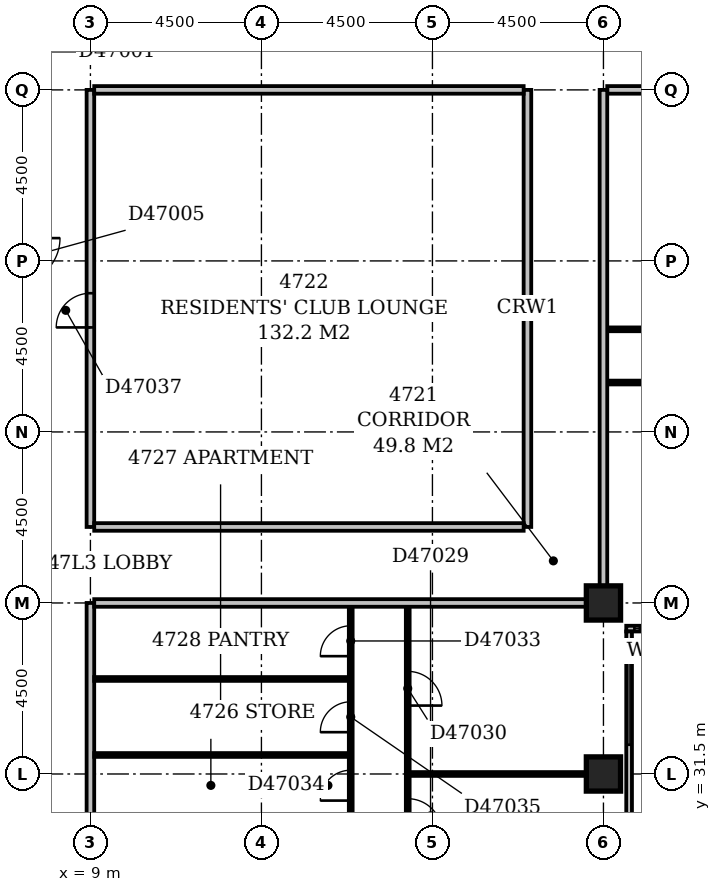
"""IFC4 building model, lengths in metres.
Left out: names, types, materials, properties, quantities, classifications, styles, units other than length and angle.
Written with IfcOpenShell. Run it as: python <this file> out.ifc"""

import sys

from ifc_helpers import new_model, si_unit, direction, frame, frame_2d, origin, origin_2d, place, context, subcontext, project, spatial, rectangle, extrude, element, fill, save


model = new_model("IFC4")
c1 = context("Model", 3, precision=1e-05, world=origin(), true_north=direction((0.0, 1.0)))
c2 = subcontext(c1, "Body", "Model", "MODEL_VIEW")
j1 = project(units=[si_unit("LENGTHUNIT", "METRE"), si_unit("PLANEANGLEUNIT", "RADIAN")], contexts=[c1])
p1 = place(None, origin())
s1 = spatial("IfcSite", under=j1, at=p1, CompositionType="ELEMENT")
p2 = place(p1, origin())
s2 = spatial("IfcBuilding", under=s1, at=p2, CompositionType="ELEMENT")
p3 = place(p2, frame((0.0, 0.0, 186.2)))
s3 = spatial("IfcBuildingStorey", under=s2, at=p3, CompositionType="ELEMENT", Elevation=186.2)
for number, where, z_axis, x_axis in (
    (1, (22.5, 31.5, -0.35), (0.0, 0.0, 1.0), (1.0, 0.0, 0.0)),
    (2, (22.5, 36.0, -0.35), (0.0, 0.0, 1.0), (1.0, 0.0, 0.0)),
):
    element("IfcColumn", number, at=place(p3, frame(where, z_axis=z_axis, x_axis=x_axis)), inside=s3, PredefinedType="COLUMN", context=c2, shape_type="SweptSolid", body=[
        extrude(rectangle(XDim=0.9, YDim=0.9, at=origin_2d()), origin(), (0.0, 0.0, 1.0), 3.65),
    ])
p4 = place(p3, frame((23.175, 17.4, 0.0), z_axis=(0.0, 0.0, 1.0), x_axis=(0.0, 1.0, 0.0)))
e3 = element("IfcWall", 3, at=p4, inside=s3, PredefinedType="STANDARD", context=c2, shape_type="SweptSolid", body=[
    extrude(rectangle(XDim=17.85, YDim=0.15, at=frame_2d((8.925, 0.0))), origin(), (0.0, 0.0, 1.0), 2.7),
])
p5 = place(p4, frame((2.937, 0.0, 0.6)))
e4 = element("IfcOpeningElement", 4, at=p5, cuts=e3, PredefinedType="OPENING", context=c2, shape_type="SweptSolid", body=[
    extrude(rectangle(XDim=1.5, YDim=1.8, at=frame_2d((0.75, 0.9))), frame((0.0, 0.087, 0.0), z_axis=(0.0, -1.0, 0.0), x_axis=(1.0, 0.0, 0.0)), (0.0, 0.0, 1.0), 0.174),
])
p6 = place(p4, frame((6.15, 0.0, 0.6)))
e5 = element("IfcOpeningElement", 5, at=p6, cuts=e3, PredefinedType="OPENING", context=c2, shape_type="SweptSolid", body=[
    extrude(rectangle(XDim=2.4, YDim=1.8, at=frame_2d((1.2, 0.9))), frame((0.0, 0.087, 0.0), z_axis=(0.0, -1.0, 0.0), x_axis=(1.0, 0.0, 0.0)), (0.0, 0.0, 1.0), 0.174),
])
p7 = place(p4, frame((10.65, 0.0, 0.6)))
e6 = element("IfcOpeningElement", 6, at=p7, cuts=e3, PredefinedType="OPENING", context=c2, shape_type="SweptSolid", body=[
    extrude(rectangle(XDim=2.4, YDim=1.8, at=frame_2d((1.2, 0.9))), frame((0.0, 0.087, 0.0), z_axis=(0.0, -1.0, 0.0), x_axis=(1.0, 0.0, 0.0)), (0.0, 0.0, 1.0), 0.174),
])
p8 = place(p4, frame((14.869, 0.0, 0.6)))
e7 = element("IfcOpeningElement", 7, at=p8, cuts=e3, PredefinedType="OPENING", context=c2, shape_type="SweptSolid", body=[
    extrude(rectangle(XDim=2.4, YDim=1.8, at=frame_2d((1.2, 0.9))), frame((0.0, 0.087, 0.0), z_axis=(0.0, -1.0, 0.0), x_axis=(1.0, 0.0, 0.0)), (0.0, 0.0, 1.0), 0.174),
])
p9 = place(p3, frame((23.1, 35.325, 0.0), z_axis=(0.0, 0.0, 1.0), x_axis=(1.0, 0.0, 0.0)))
e8 = element("IfcWall", 8, at=p9, inside=s3, PredefinedType="STANDARD", context=c2, shape_type="SweptSolid", body=[
    extrude(rectangle(XDim=27.15, YDim=0.15, at=frame_2d((13.575, 0.0))), origin(), (0.0, 0.0, 1.0), 2.7),
])
p10 = place(p9, frame((0.214, 0.0, 0.6)))
e9 = element("IfcOpeningElement", 9, at=p10, cuts=e8, PredefinedType="OPENING", context=c2, shape_type="SweptSolid", body=[
    extrude(rectangle(XDim=0.45, YDim=1.8, at=frame_2d((0.225, 0.9))), frame((0.0, 0.087, 0.0), z_axis=(0.0, -1.0, 0.0), x_axis=(1.0, 0.0, 0.0)), (0.0, 0.0, 1.0), 0.174),
])
p11 = place(p9, frame((2.239, 0.0, 0.6)))
e10 = element("IfcOpeningElement", 10, at=p11, cuts=e8, PredefinedType="OPENING", context=c2, shape_type="SweptSolid", body=[
    extrude(rectangle(XDim=0.9, YDim=1.8, at=frame_2d((0.45, 0.9))), frame((0.0, 0.087, 0.0), z_axis=(0.0, -1.0, 0.0), x_axis=(1.0, 0.0, 0.0)), (0.0, 0.0, 1.0), 0.174),
])
p12 = place(p9, frame((4.95, 0.0, 0.6)))
e11 = element("IfcOpeningElement", 11, at=p12, cuts=e8, PredefinedType="OPENING", context=c2, shape_type="SweptSolid", body=[
    extrude(rectangle(XDim=2.4, YDim=1.8, at=frame_2d((1.2, 0.9))), frame((0.0, 0.087, 0.0), z_axis=(0.0, -1.0, 0.0), x_axis=(1.0, 0.0, 0.0)), (0.0, 0.0, 1.0), 0.174),
])
p13 = place(p9, frame((9.45, 0.0, 0.6)))
e12 = element("IfcOpeningElement", 12, at=p13, cuts=e8, PredefinedType="OPENING", context=c2, shape_type="SweptSolid", body=[
    extrude(rectangle(XDim=2.4, YDim=1.8, at=frame_2d((1.2, 0.9))), frame((0.0, 0.087, 0.0), z_axis=(0.0, -1.0, 0.0), x_axis=(1.0, 0.0, 0.0)), (0.0, 0.0, 1.0), 0.174),
])
p14 = place(p9, frame((13.95, 0.0, 0.6)))
e13 = element("IfcOpeningElement", 13, at=p14, cuts=e8, PredefinedType="OPENING", context=c2, shape_type="SweptSolid", body=[
    extrude(rectangle(XDim=2.4, YDim=1.8, at=frame_2d((1.2, 0.9))), frame((0.0, 0.087, 0.0), z_axis=(0.0, -1.0, 0.0), x_axis=(1.0, 0.0, 0.0)), (0.0, 0.0, 1.0), 0.174),
])
p15 = place(p9, frame((18.45, 0.0, 0.6)))
e14 = element("IfcOpeningElement", 14, at=p15, cuts=e8, PredefinedType="OPENING", context=c2, shape_type="SweptSolid", body=[
    extrude(rectangle(XDim=2.4, YDim=1.8, at=frame_2d((1.2, 0.9))), frame((0.0, 0.087, 0.0), z_axis=(0.0, -1.0, 0.0), x_axis=(1.0, 0.0, 0.0)), (0.0, 0.0, 1.0), 0.174),
])
p16 = place(p9, frame((22.631, 0.0, 0.6)))
e15 = element("IfcOpeningElement", 15, at=p16, cuts=e8, PredefinedType="OPENING", context=c2, shape_type="SweptSolid", body=[
    extrude(rectangle(XDim=1.8, YDim=1.8, at=frame_2d((0.9, 0.9))), frame((0.0, 0.087, 0.0), z_axis=(0.0, -1.0, 0.0), x_axis=(1.0, 0.0, 0.0)), (0.0, 0.0, 1.0), 0.174),
])
p17 = place(p3, frame((9.0, 5.0, 0.0), z_axis=(0.0, 0.0, 1.0), x_axis=(0.0, 1.0, 0.0)))
e16 = element("IfcWall", 16, at=p17, inside=s3, PredefinedType="PARTITIONING", context=c2, shape_type="SweptSolid", body=[
    extrude(rectangle(XDim=31.0, YDim=0.2, at=frame_2d((15.5, 0.0))), origin(), (0.0, 0.0, 1.0), 3.3),
])
p18 = place(p17, frame((17.8, 0.0, 0.0)))
e17 = element("IfcOpeningElement", 17, at=p18, cuts=e16, PredefinedType="OPENING", context=c2, shape_type="SweptSolid", body=[
    extrude(rectangle(XDim=1.0, YDim=2.1, at=frame_2d((0.5, 1.05))), frame((0.0, 0.112, 0.0), z_axis=(0.0, -1.0, 0.0), x_axis=(1.0, 0.0, 0.0)), (0.0, 0.0, 1.0), 0.224),
])
p19 = place(p17, frame((14.95, 0.0, 0.0)))
e18 = element("IfcOpeningElement", 18, at=p19, cuts=e16, PredefinedType="OPENING", context=c2, shape_type="SweptSolid", body=[
    extrude(rectangle(XDim=1.0, YDim=2.1, at=frame_2d((0.5, 1.05))), frame((0.0, 0.112, 0.0), z_axis=(0.0, -1.0, 0.0), x_axis=(1.0, 0.0, 0.0)), (0.0, 0.0, 1.0), 0.224),
])
p20 = place(p17, frame((9.3, 0.0, 0.0)))
e19 = element("IfcOpeningElement", 19, at=p20, cuts=e16, PredefinedType="OPENING", context=c2, shape_type="SweptSolid", body=[
    extrude(rectangle(XDim=1.0, YDim=2.1, at=frame_2d((0.5, 1.05))), frame((0.0, 0.112, 0.0), z_axis=(0.0, -1.0, 0.0), x_axis=(1.0, 0.0, 0.0)), (0.0, 0.0, 1.0), 0.224),
])
p21 = place(p17, frame((1.5, 0.0, 0.0)))
e20 = element("IfcOpeningElement", 20, at=p21, cuts=e16, PredefinedType="OPENING", context=c2, shape_type="SweptSolid", body=[
    extrude(rectangle(XDim=0.9, YDim=2.1, at=frame_2d((0.45, 1.05))), frame((0.0, 0.112, 0.0), z_axis=(0.0, -1.0, 0.0), x_axis=(1.0, 0.0, 0.0)), (0.0, 0.0, 1.0), 0.224),
])
p22 = place(p3, frame((17.35, 22.6, 0.0), z_axis=(0.0, 0.0, 1.0), x_axis=(0.0, 1.0, 0.0)))
e21 = element("IfcWall", 21, at=p22, inside=s3, PredefinedType="PARTITIONING", context=c2, shape_type="SweptSolid", body=[
    extrude(rectangle(XDim=13.3, YDim=0.1, at=frame_2d((6.65, 0.0))), origin(), (0.0, 0.0, 1.0), 3.3),
])
p23 = place(p22, frame((1.7, 0.0, 0.0)))
e22 = element("IfcOpeningElement", 22, at=p23, cuts=e21, PredefinedType="OPENING", context=c2, shape_type="SweptSolid", body=[
    extrude(rectangle(XDim=0.9, YDim=2.1, at=frame_2d((0.45, 1.05))), frame((0.0, 0.062, 0.0), z_axis=(0.0, -1.0, 0.0), x_axis=(1.0, 0.0, 0.0)), (0.0, 0.0, 1.0), 0.124),
])
p24 = place(p22, frame((7.35, 0.0, 0.0)))
e23 = element("IfcOpeningElement", 23, at=p24, cuts=e21, PredefinedType="OPENING", context=c2, shape_type="SweptSolid", body=[
    extrude(rectangle(XDim=0.9, YDim=2.1, at=frame_2d((0.45, 1.05))), frame((0.0, 0.062, 0.0), z_axis=(0.0, -1.0, 0.0), x_axis=(1.0, 0.0, 0.0)), (0.0, 0.0, 1.0), 0.124),
])
p25 = place(p22, frame((10.7, 0.0, 0.0)))
e24 = element("IfcOpeningElement", 24, at=p25, cuts=e21, PredefinedType="OPENING", context=c2, shape_type="SweptSolid", body=[
    extrude(rectangle(XDim=0.9, YDim=2.1, at=frame_2d((0.45, 1.05))), frame((0.0, 0.062, 0.0), z_axis=(0.0, -1.0, 0.0), x_axis=(1.0, 0.0, 0.0)), (0.0, 0.0, 1.0), 0.124),
])
p26 = place(p3, frame((15.85, 24.1, 0.0), z_axis=(0.0, 0.0, 1.0), x_axis=(0.0, 1.0, 0.0)))
e25 = element("IfcWall", 25, at=p26, inside=s3, PredefinedType="PARTITIONING", context=c2, shape_type="SweptSolid", body=[
    extrude(rectangle(XDim=11.8, YDim=0.1, at=frame_2d((5.9, 0.0))), origin(), (0.0, 0.0, 1.0), 3.3),
])
p27 = place(p26, frame((4.7, 0.0, 0.0)))
e26 = element("IfcOpeningElement", 26, at=p27, cuts=e25, PredefinedType="OPENING", context=c2, shape_type="SweptSolid", body=[
    extrude(rectangle(XDim=0.8, YDim=2.1, at=frame_2d((0.4, 1.05))), frame((0.0, 0.062, 0.0), z_axis=(0.0, -1.0, 0.0), x_axis=(1.0, 0.0, 0.0)), (0.0, 0.0, 1.0), 0.124),
])
p28 = place(p26, frame((1.5, 0.0, 0.0)))
e27 = element("IfcOpeningElement", 27, at=p28, cuts=e25, PredefinedType="OPENING", context=c2, shape_type="SweptSolid", body=[
    extrude(rectangle(XDim=0.9, YDim=2.1, at=frame_2d((0.45, 1.05))), frame((0.0, 0.062, 0.0), z_axis=(0.0, -1.0, 0.0), x_axis=(1.0, 0.0, 0.0)), (0.0, 0.0, 1.0), 0.124),
])
p29 = place(p26, frame((10.5, 0.0, 0.0)))
e28 = element("IfcOpeningElement", 28, at=p29, cuts=e25, PredefinedType="OPENING", context=c2, shape_type="SweptSolid", body=[
    extrude(rectangle(XDim=0.8, YDim=2.1, at=frame_2d((0.4, 1.05))), frame((0.0, 0.062, 0.0), z_axis=(0.0, -1.0, 0.0), x_axis=(1.0, 0.0, 0.0)), (0.0, 0.0, 1.0), 0.124),
])
p30 = place(p26, frame((6.7, 0.0, 0.0)))
e29 = element("IfcOpeningElement", 29, at=p30, cuts=e25, PredefinedType="OPENING", context=c2, shape_type="SweptSolid", body=[
    extrude(rectangle(XDim=0.8, YDim=2.1, at=frame_2d((0.4, 1.05))), frame((0.0, 0.062, 0.0), z_axis=(0.0, -1.0, 0.0), x_axis=(1.0, 0.0, 0.0)), (0.0, 0.0, 1.0), 0.124),
])
p31 = place(p26, frame((8.5, 0.0, 0.0)))
e30 = element("IfcOpeningElement", 30, at=p31, cuts=e25, PredefinedType="OPENING", context=c2, shape_type="SweptSolid", body=[
    extrude(rectangle(XDim=0.8, YDim=2.1, at=frame_2d((0.4, 1.05))), frame((0.0, 0.062, 0.0), z_axis=(0.0, -1.0, 0.0), x_axis=(1.0, 0.0, 0.0)), (0.0, 0.0, 1.0), 0.124),
])
p32 = place(p3, frame((17.4, 31.5, 0.0), z_axis=(0.0, 0.0, 1.0), x_axis=(1.0, 0.0, 0.0)))
e31 = element("IfcWall", 31, at=p32, inside=s3, PredefinedType="PARTITIONING", context=c2, shape_type="SweptSolid", body=[
    extrude(rectangle(XDim=4.65, YDim=0.1, at=frame_2d((2.325, 0.0))), origin(), (0.0, 0.0, 1.0), 3.3),
])
for number, where, z_axis, x_axis in (
    (32, (9.1, 32.0, 0.0), (0.0, 0.0, 1.0), (1.0, 0.0, 0.0)),
    (33, (9.1, 34.0, 0.0), (0.0, 0.0, 1.0), (1.0, 0.0, 0.0)),
):
    element("IfcWall", number, at=place(p3, frame(where, z_axis=z_axis, x_axis=x_axis)), inside=s3, PredefinedType="PARTITIONING", context=c2, shape_type="SweptSolid", body=[
        extrude(rectangle(XDim=6.7, YDim=0.1, at=frame_2d((3.35, 0.0))), origin(), (0.0, 0.0, 1.0), 3.3),
    ])
p33 = place(p3, frame((9.1, 36.0, 0.0), z_axis=(0.0, 0.0, 1.0), x_axis=(1.0, 0.0, 0.0)))
e34 = element("IfcWall", 34, at=p33, inside=s3, PredefinedType="PARTITIONING", context=c2, shape_type="SweptSolid", body=[
    extrude(rectangle(XDim=12.95, YDim=0.2, at=frame_2d((6.475, 0.0))), origin(), (0.0, 0.0, 1.0), 3.3),
])
p34 = place(p3, frame((22.5, 36.45, 0.0), z_axis=(0.0, 0.0, 1.0), x_axis=(0.0, 1.0, 0.0)))
e35 = element("IfcWall", 35, at=p34, inside=s3, PredefinedType="PARTITIONING", context=c2, shape_type="SweptSolid", body=[
    extrude(rectangle(XDim=13.05, YDim=0.2, at=frame_2d((6.525, 0.0))), origin(), (0.0, 0.0, 1.0), 3.3),
])
p35 = place(p3, frame((9.0, 38.0, 0.0), z_axis=(0.0, 0.0, 1.0), x_axis=(0.0, 1.0, 0.0)))
e36 = element("IfcWall", 36, at=p35, inside=s3, PredefinedType="PARTITIONING", context=c2, shape_type="SweptSolid", body=[
    extrude(rectangle(XDim=11.5, YDim=0.2, at=frame_2d((5.75, 0.0))), origin(), (0.0, 0.0, 1.0), 3.3),
])
p36 = place(p35, frame((5.25, 0.0, 0.0)))
e37 = element("IfcOpeningElement", 37, at=p36, cuts=e36, PredefinedType="OPENING", context=c2, shape_type="SweptSolid", body=[
    extrude(rectangle(XDim=0.9, YDim=2.1, at=frame_2d((0.45, 1.05))), frame((0.0, 0.112, 0.0), z_axis=(0.0, -1.0, 0.0), x_axis=(1.0, 0.0, 0.0)), (0.0, 0.0, 1.0), 0.224),
])
p37 = place(p3, frame((9.1, 38.0, 0.0), z_axis=(0.0, 0.0, 1.0), x_axis=(1.0, 0.0, 0.0)))
e38 = element("IfcWall", 38, at=p37, inside=s3, PredefinedType="PARTITIONING", context=c2, shape_type="SweptSolid", body=[
    extrude(rectangle(XDim=11.3, YDim=0.2, at=frame_2d((5.65, 0.0))), origin(), (0.0, 0.0, 1.0), 3.3),
])
p38 = place(p3, frame((20.5, 38.0, 0.0), z_axis=(0.0, 0.0, 1.0), x_axis=(0.0, 1.0, 0.0)))
e39 = element("IfcWall", 39, at=p38, inside=s3, PredefinedType="PARTITIONING", context=c2, shape_type="SweptSolid", body=[
    extrude(rectangle(XDim=11.5, YDim=0.2, at=frame_2d((5.75, 0.0))), origin(), (0.0, 0.0, 1.0), 3.3),
])
p39 = place(p3, frame((22.6, 41.8, 0.0), z_axis=(0.0, 0.0, 1.0), x_axis=(1.0, 0.0, 0.0)))
e40 = element("IfcWall", 40, at=p39, inside=s3, PredefinedType="PARTITIONING", context=c2, shape_type="SweptSolid", body=[
    extrude(rectangle(XDim=13.3, YDim=0.1, at=frame_2d((6.65, 0.0))), origin(), (0.0, 0.0, 1.0), 3.3),
])
p40 = place(p39, frame((1.7, 0.0, 0.0)))
e41 = element("IfcOpeningElement", 41, at=p40, cuts=e40, PredefinedType="OPENING", context=c2, shape_type="SweptSolid", body=[
    extrude(rectangle(XDim=0.9, YDim=2.1, at=frame_2d((0.45, 1.05))), frame((0.0, 0.062, 0.0), z_axis=(0.0, -1.0, 0.0), x_axis=(1.0, 0.0, 0.0)), (0.0, 0.0, 1.0), 0.124),
])
p41 = place(p39, frame((6.2, 0.0, 0.0)))
e42 = element("IfcOpeningElement", 42, at=p41, cuts=e40, PredefinedType="OPENING", context=c2, shape_type="SweptSolid", body=[
    extrude(rectangle(XDim=0.9, YDim=2.1, at=frame_2d((0.45, 1.05))), frame((0.0, 0.062, 0.0), z_axis=(0.0, -1.0, 0.0), x_axis=(1.0, 0.0, 0.0)), (0.0, 0.0, 1.0), 0.124),
])
p42 = place(p39, frame((10.7, 0.0, 0.0)))
e43 = element("IfcOpeningElement", 43, at=p42, cuts=e40, PredefinedType="OPENING", context=c2, shape_type="SweptSolid", body=[
    extrude(rectangle(XDim=0.9, YDim=2.1, at=frame_2d((0.45, 1.05))), frame((0.0, 0.062, 0.0), z_axis=(0.0, -1.0, 0.0), x_axis=(1.0, 0.0, 0.0)), (0.0, 0.0, 1.0), 0.124),
])
p43 = place(p3, frame((22.6, 43.2, 0.0), z_axis=(0.0, 0.0, 1.0), x_axis=(1.0, 0.0, 0.0)))
e44 = element("IfcWall", 44, at=p43, inside=s3, PredefinedType="PARTITIONING", context=c2, shape_type="SweptSolid", body=[
    extrude(rectangle(XDim=5.75, YDim=0.1, at=frame_2d((2.875, 0.0))), origin(), (0.0, 0.0, 1.0), 3.3),
])
p44 = place(p43, frame((2.4, 0.0, 0.0)))
e45 = element("IfcOpeningElement", 45, at=p44, cuts=e44, PredefinedType="OPENING", context=c2, shape_type="SweptSolid", body=[
    extrude(rectangle(XDim=0.9, YDim=2.1, at=frame_2d((0.45, 1.05))), frame((0.0, 0.062, 0.0), z_axis=(0.0, -1.0, 0.0), x_axis=(1.0, 0.0, 0.0)), (0.0, 0.0, 1.0), 0.124),
])
p45 = place(p3, frame((9.1, 49.5, 0.0), z_axis=(0.0, 0.0, 1.0), x_axis=(1.0, 0.0, 0.0)))
e46 = element("IfcWall", 46, at=p45, inside=s3, PredefinedType="PARTITIONING", context=c2, shape_type="SweptSolid", body=[
    extrude(rectangle(XDim=11.3, YDim=0.2, at=frame_2d((5.65, 0.0))), origin(), (0.0, 0.0, 1.0), 3.3),
])
p46 = place(p3, frame((22.6, 49.5, 0.0), z_axis=(0.0, 0.0, 1.0), x_axis=(1.0, 0.0, 0.0)))
e47 = element("IfcWall", 47, at=p46, inside=s3, PredefinedType="PARTITIONING", context=c2, shape_type="SweptSolid", body=[
    extrude(rectangle(XDim=30.95, YDim=0.2, at=frame_2d((15.475, 0.0))), origin(), (0.0, 0.0, 1.0), 3.3),
])
p47 = place(p46, frame((6.1, 0.0, 0.0)))
e48 = element("IfcOpeningElement", 48, at=p47, cuts=e47, PredefinedType="OPENING", context=c2, shape_type="SweptSolid", body=[
    extrude(rectangle(XDim=1.0, YDim=2.1, at=frame_2d((0.5, 1.05))), frame((0.0, 0.112, 0.0), z_axis=(0.0, -1.0, 0.0), x_axis=(1.0, 0.0, 0.0)), (0.0, 0.0, 1.0), 0.224),
])
p48 = place(p46, frame((13.7, 0.0, 0.0)))
e49 = element("IfcOpeningElement", 49, at=p48, cuts=e47, PredefinedType="OPENING", context=c2, shape_type="SweptSolid", body=[
    extrude(rectangle(XDim=1.0, YDim=2.1, at=frame_2d((0.5, 1.05))), frame((0.0, 0.112, 0.0), z_axis=(0.0, -1.0, 0.0), x_axis=(1.0, 0.0, 0.0)), (0.0, 0.0, 1.0), 0.224),
])
p49 = place(p46, frame((27.15, 0.0, 0.0)))
e50 = element("IfcOpeningElement", 50, at=p49, cuts=e47, PredefinedType="OPENING", context=c2, shape_type="SweptSolid", body=[
    extrude(rectangle(XDim=1.0, YDim=2.1, at=frame_2d((0.5, 1.05))), frame((0.0, 0.112, 0.0), z_axis=(0.0, -1.0, 0.0), x_axis=(1.0, 0.0, 0.0)), (0.0, 0.0, 1.0), 0.224),
])
p50 = place(p8, origin())
e51 = element("IfcWindow", 51, at=p50, inside=s3, PartitioningType="SINGLE_PANEL", PredefinedType="WINDOW", context=c2, shape_type="SweptSolid", body=[
    extrude(rectangle(XDim=2.4, YDim=1.8, at=frame_2d((1.2, 0.9))), frame((0.0, 0.03, 0.0), z_axis=(0.0, -1.0, 0.0), x_axis=(1.0, 0.0, 0.0)), (0.0, 0.0, 1.0), 0.06),
])
fill(e7, e51)
p51 = place(p10, origin())
e52 = element("IfcWindow", 52, at=p51, inside=s3, PartitioningType="SINGLE_PANEL", PredefinedType="WINDOW", context=c2, shape_type="SweptSolid", body=[
    extrude(rectangle(XDim=0.45, YDim=1.8, at=frame_2d((0.225, 0.9))), frame((0.0, 0.03, 0.0), z_axis=(0.0, -1.0, 0.0), x_axis=(1.0, 0.0, 0.0)), (0.0, 0.0, 1.0), 0.06),
])
fill(e9, e52)
p52 = place(p24, frame((0.9, 0.0, 0.0), z_axis=(0.0, 0.0, 1.0), x_axis=(-1.0, 0.0, 0.0)))
e53 = element("IfcDoor", 53, at=p52, inside=s3, OperationType="SINGLE_SWING_RIGHT", PredefinedType="DOOR", context=c2, shape_type="SweptSolid", body=[
    extrude(rectangle(XDim=0.9, YDim=2.1, at=frame_2d((0.45, 1.05))), frame((0.0, 0.025, 0.0), z_axis=(0.0, -1.0, 0.0), x_axis=(1.0, 0.0, 0.0)), (0.0, 0.0, 1.0), 0.05),
])
fill(e23, e53)
p53 = place(p25, frame((0.9, 0.0, 0.0), z_axis=(0.0, 0.0, 1.0), x_axis=(-1.0, 0.0, 0.0)))
e54 = element("IfcDoor", 54, at=p53, inside=s3, OperationType="SINGLE_SWING_RIGHT", PredefinedType="DOOR", context=c2, shape_type="SweptSolid", body=[
    extrude(rectangle(XDim=0.9, YDim=2.1, at=frame_2d((0.45, 1.05))), frame((0.0, 0.025, 0.0), z_axis=(0.0, -1.0, 0.0), x_axis=(1.0, 0.0, 0.0)), (0.0, 0.0, 1.0), 0.05),
])
fill(e24, e54)
p54 = place(p29, origin())
e55 = element("IfcDoor", 55, at=p54, inside=s3, OperationType="SINGLE_SWING_LEFT", PredefinedType="DOOR", context=c2, shape_type="SweptSolid", body=[
    extrude(rectangle(XDim=0.8, YDim=2.1, at=frame_2d((0.4, 1.05))), frame((0.0, 0.025, 0.0), z_axis=(0.0, -1.0, 0.0), x_axis=(1.0, 0.0, 0.0)), (0.0, 0.0, 1.0), 0.05),
])
fill(e28, e55)
p55 = place(p30, origin())
e56 = element("IfcDoor", 56, at=p55, inside=s3, OperationType="SINGLE_SWING_LEFT", PredefinedType="DOOR", context=c2, shape_type="SweptSolid", body=[
    extrude(rectangle(XDim=0.8, YDim=2.1, at=frame_2d((0.4, 1.05))), frame((0.0, 0.025, 0.0), z_axis=(0.0, -1.0, 0.0), x_axis=(1.0, 0.0, 0.0)), (0.0, 0.0, 1.0), 0.05),
])
fill(e29, e56)
p56 = place(p31, origin())
e57 = element("IfcDoor", 57, at=p56, inside=s3, OperationType="SINGLE_SWING_LEFT", PredefinedType="DOOR", context=c2, shape_type="SweptSolid", body=[
    extrude(rectangle(XDim=0.8, YDim=2.1, at=frame_2d((0.4, 1.05))), frame((0.0, 0.025, 0.0), z_axis=(0.0, -1.0, 0.0), x_axis=(1.0, 0.0, 0.0)), (0.0, 0.0, 1.0), 0.05),
])
fill(e30, e57)
p57 = place(p36, origin())
e58 = element("IfcDoor", 58, at=p57, inside=s3, OperationType="SINGLE_SWING_LEFT", PredefinedType="DOOR", context=c2, shape_type="SweptSolid", body=[
    extrude(rectangle(XDim=0.9, YDim=2.1, at=frame_2d((0.45, 1.05))), frame((0.0, 0.025, 0.0), z_axis=(0.0, -1.0, 0.0), x_axis=(1.0, 0.0, 0.0)), (0.0, 0.0, 1.0), 0.05),
])
fill(e37, e58)
save(model, sys.argv[1])
